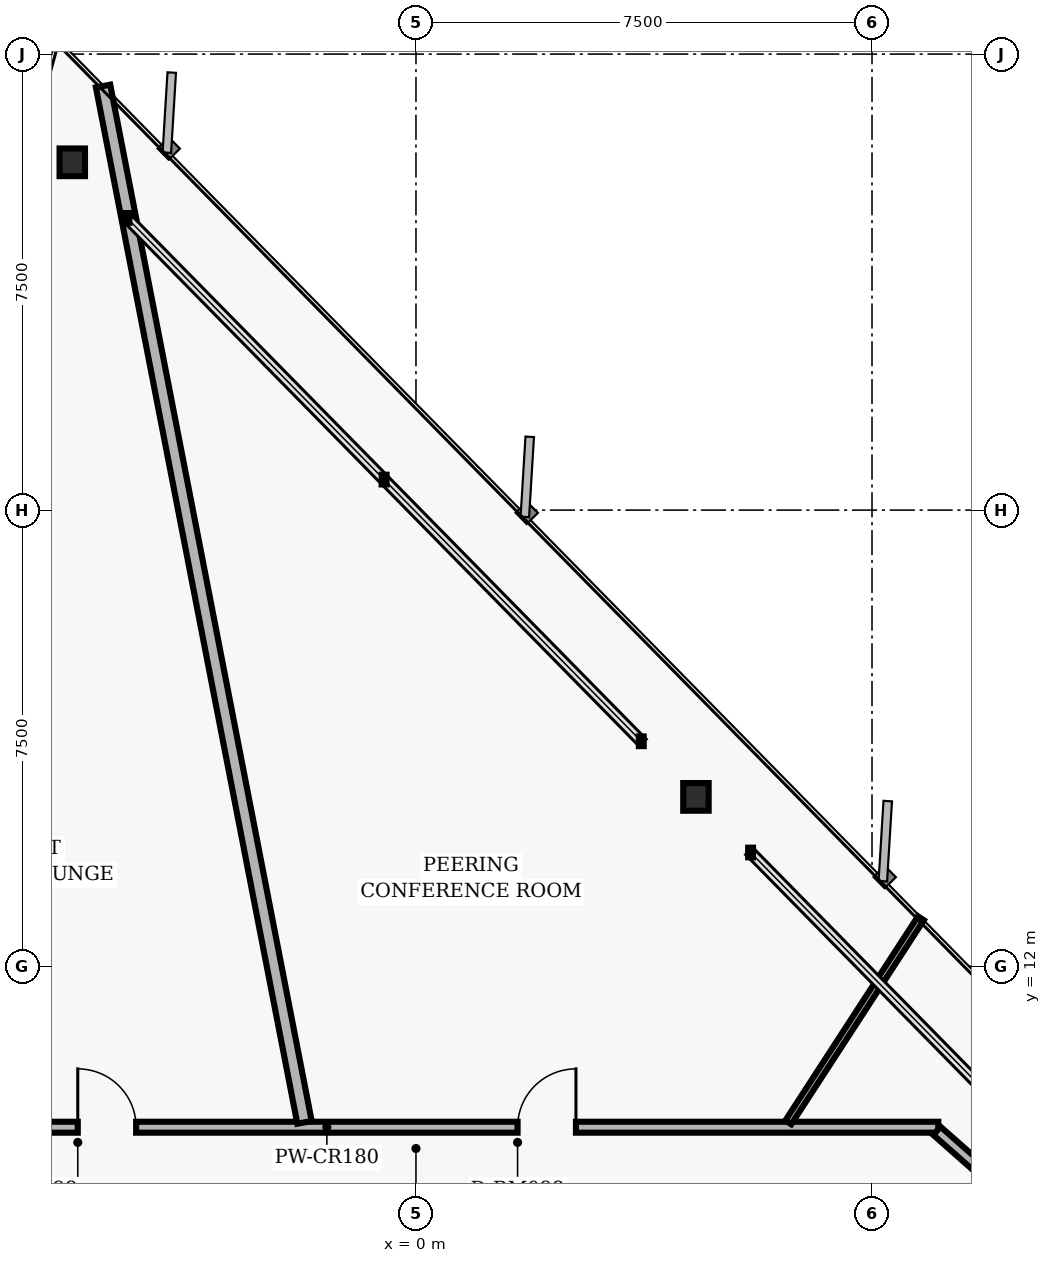
"""IFC4 building model, lengths in metres.
Left out: names, types, materials, properties, quantities, classifications, styles, units other than length and angle.
Written with IfcOpenShell. Run it as: python <this file> out.ifc"""

import sys

from ifc_helpers import new_model, si_unit, direction, frame, frame_2d, origin, origin_2d, place, context, subcontext, project, spatial, rectangle, i_section, extrude, element, fill, save


model = new_model("IFC4")
c1 = context("Model", 3, precision=1e-05, world=origin(), true_north=direction((0.0, 1.0)))
c2 = subcontext(c1, "Body", "Model", "MODEL_VIEW")
j1 = project(units=[si_unit("LENGTHUNIT", "METRE"), si_unit("PLANEANGLEUNIT", "RADIAN")], contexts=[c1])
p1 = place(None, origin())
s1 = spatial("IfcSite", under=j1, at=p1, CompositionType="ELEMENT")
p2 = place(p1, origin())
s2 = spatial("IfcBuilding", under=s1, at=p2, CompositionType="ELEMENT")
p3 = place(p2, frame((0.0, 0.0, 76.48)))
s3 = spatial("IfcBuildingStorey", under=s2, at=p3, CompositionType="ELEMENT", Elevation=76.48)
for number, where, z_axis, x_axis in (
    (1, (4.604, 14.783, 0.0), (0.0, 0.0, 1.0), (1.0, 0.0, 0.0)),
    (2, (-5.652, 25.22, 0.0), (0.0, 0.0, 1.0), (1.0, 0.0, 0.0)),
):
    element("IfcColumn", number, at=place(p3, frame(where, z_axis=z_axis, x_axis=x_axis)), inside=s3, PredefinedType="COLUMN", context=c2, shape_type="SweptSolid", body=[
        extrude(i_section(OverallWidth=0.418, OverallDepth=0.455, WebThickness=0.042, FlangeThickness=0.068, FilletRadius=0.025, at=origin_2d()), origin(), (0.0, 0.0, 1.0), 3.04),
    ])
p4 = place(p3, frame((-8.59, 9.35, 0.0), z_axis=(0.0, 0.0, 1.0), x_axis=(1.0, 0.0, 0.0)))
e3 = element("IfcWall", 3, at=p4, inside=s3, PredefinedType="PARTITIONING", context=c2, shape_type="SweptSolid", body=[
    extrude(rectangle(XDim=17.18, YDim=0.18, at=frame_2d((8.59, 0.0))), origin(), (0.0, 0.0, 1.0), 2.277),
])
p5 = place(p4, frame((10.261, 0.0, 0.0)))
e4 = element("IfcOpeningElement", 4, at=p5, cuts=e3, PredefinedType="OPENING", context=c2, shape_type="SweptSolid", body=[
    extrude(rectangle(XDim=0.96, YDim=2.02, at=frame_2d((0.48, 1.01))), frame((0.0, 0.1, 0.0), z_axis=(0.0, -1.0, 0.0), x_axis=(1.0, 0.0, 0.0)), (0.0, 0.0, 1.0), 0.2),
])
p6 = place(p4, frame((3.028, 0.0, 0.0)))
e5 = element("IfcOpeningElement", 5, at=p6, cuts=e3, PredefinedType="OPENING", context=c2, shape_type="SweptSolid", body=[
    extrude(rectangle(XDim=0.96, YDim=2.02, at=frame_2d((0.48, 1.01))), frame((0.0, 0.1, 0.0), z_axis=(0.0, -1.0, 0.0), x_axis=(1.0, 0.0, 0.0)), (0.0, 0.0, 1.0), 0.2),
])
p7 = place(p3, frame((8.567, 9.29, 0.0), z_axis=(0.0, 0.0, 1.0), x_axis=(0.749626463267, -0.66186113768, 0.0)))
e6 = element("IfcWall", 6, at=p7, inside=s3, PredefinedType="PARTITIONING", context=c2, shape_type="SweptSolid", body=[
    extrude(rectangle(XDim=6.27, YDim=0.18, at=frame_2d((3.135, 0.0))), origin(), (0.0, 0.0, 1.0), 2.277),
])
p8 = place(p7, frame((2.655, 0.0, 0.0)))
e7 = element("IfcOpeningElement", 7, at=p8, cuts=e6, PredefinedType="OPENING", context=c2, shape_type="SweptSolid", body=[
    extrude(rectangle(XDim=0.96, YDim=2.02, at=frame_2d((0.48, 1.01))), frame((0.0, 0.1, 0.0), z_axis=(0.0, -1.0, 0.0), x_axis=(1.0, 0.0, 0.0)), (0.0, 0.0, 1.0), 0.2),
])
p9 = place(p3, frame((6.124, 9.43, 0.0), z_axis=(0.0, 0.0, 1.0), x_axis=(0.544653909872, 0.838660907912, 0.0)))
e8 = element("IfcWall", 8, at=p9, inside=s3, PredefinedType="MOVABLE", context=c2, shape_type="SweptSolid", body=[
    extrude(rectangle(XDim=4.003, YDim=0.115, at=frame_2d((2.002, 0.0))), origin(), (0.0, 0.0, 1.0), 2.763),
])
p10 = place(p3, frame((-1.833, 9.43, 0.0), z_axis=(0.0, 0.0, 1.0), x_axis=(-0.190802669454, 0.981628413061, 0.0)))
e9 = element("IfcWall", 9, at=p10, inside=s3, PredefinedType="PARTITIONING", context=c2, shape_type="SweptSolid", body=[
    extrude(rectangle(XDim=17.364, YDim=0.24, at=frame_2d((8.682, 0.0))), origin(), (0.0, 0.0, 1.0), 2.763),
])
p11 = place(p5, origin())
e10 = element("IfcDoor", 10, at=p11, inside=s3, OperationType="SINGLE_SWING_RIGHT", PredefinedType="DOOR", context=c2, shape_type="SweptSolid", body=[
    extrude(rectangle(XDim=0.96, YDim=2.02, at=frame_2d((0.48, 1.01))), frame((0.0, 0.025, 0.0), z_axis=(0.0, -1.0, 0.0), x_axis=(1.0, 0.0, 0.0)), (0.0, 0.0, 1.0), 0.05),
])
fill(e4, e10)
p12 = place(p6, origin())
e11 = element("IfcDoor", 11, at=p12, inside=s3, OperationType="SINGLE_SWING_LEFT", PredefinedType="DOOR", context=c2, shape_type="SweptSolid", body=[
    extrude(rectangle(XDim=0.96, YDim=2.02, at=frame_2d((0.48, 1.01))), frame((0.0, 0.025, 0.0), z_axis=(0.0, -1.0, 0.0), x_axis=(1.0, 0.0, 0.0)), (0.0, 0.0, 1.0), 0.05),
])
fill(e5, e11)
save(model, sys.argv[1])
